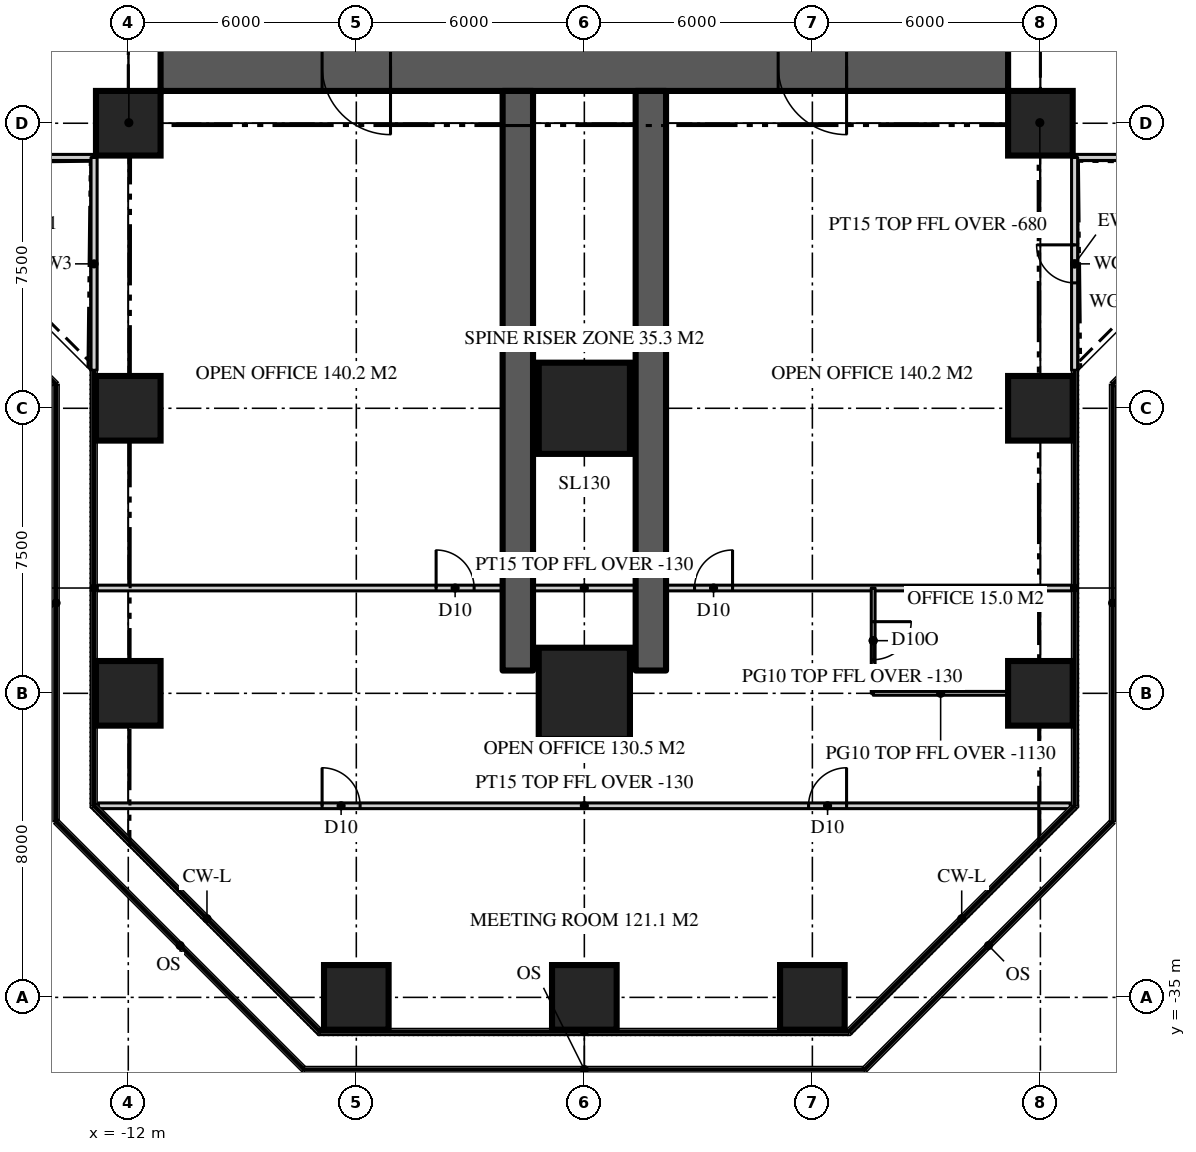
"""IFC4 building model, lengths in metres.
Left out: names, types, materials, properties, quantities, classifications, styles, units other than length and angle.
Written with IfcOpenShell. Run it as: python <this file> out.ifc"""

import sys

from ifc_helpers import new_model, si_unit, direction, frame, frame_2d, origin, origin_2d, place, context, subcontext, project, spatial, rectangle, extrude, element, fill, save


model = new_model("IFC4")
c1 = context("Model", 3, precision=1e-05, world=origin(), true_north=direction((0.0, 1.0)))
c2 = subcontext(c1, "Body", "Model", "MODEL_VIEW")
j1 = project(units=[si_unit("LENGTHUNIT", "METRE"), si_unit("PLANEANGLEUNIT", "RADIAN")], contexts=[c1])
p1 = place(None, origin())
s1 = spatial("IfcSite", under=j1, at=p1, CompositionType="ELEMENT")
p2 = place(p1, origin())
s2 = spatial("IfcBuilding", under=s1, at=p2, CompositionType="ELEMENT")
p3 = place(p2, frame((0.0, 0.0, 63.0)))
s3 = spatial("IfcBuildingStorey", under=s2, at=p3, CompositionType="ELEMENT", Elevation=63.0)
p4 = place(p3, frame((11.15, -10.5, 0.0), z_axis=(0.0, 0.0, 1.0), x_axis=(-1.0, 0.0, 0.0)))
e1 = element("IfcWall", 1, at=p4, inside=s3, PredefinedType="SHEAR", context=c2, shape_type="SweptSolid", body=[
    extrude(rectangle(XDim=22.3, YDim=1.3, at=frame_2d((11.15, 0.0))), origin(), (0.0, 0.0, 1.0), 3.9),
])
p5 = place(p4, frame((16.25, 0.0, 0.0)))
e2 = element("IfcOpeningElement", 2, at=p5, cuts=e1, PredefinedType="OPENING", context=c2, shape_type="SweptSolid", body=[
    extrude(rectangle(XDim=1.8, YDim=2.2, at=frame_2d((0.9, 1.1))), frame((0.0, 0.66, 0.0), z_axis=(0.0, -1.0, 0.0), x_axis=(1.0, 0.0, 0.0)), (0.0, 0.0, 1.0), 1.32),
])
p6 = place(p4, frame((4.25, 0.0, 0.0)))
e3 = element("IfcOpeningElement", 3, at=p6, cuts=e1, PredefinedType="OPENING", context=c2, shape_type="SweptSolid", body=[
    extrude(rectangle(XDim=1.8, YDim=2.2, at=frame_2d((0.9, 1.1))), frame((0.0, 0.66, 0.0), z_axis=(0.0, -1.0, 0.0), x_axis=(1.0, 0.0, 0.0)), (0.0, 0.0, 1.0), 1.32),
])
for number, where, z_axis, x_axis in (
    (4, (-1.75, -11.15, 0.0), (0.0, 0.0, 1.0), (0.0, -1.0, 0.0)),
    (5, (1.75, -11.15, 0.0), (0.0, 0.0, 1.0), (0.0, -1.0, 0.0)),
):
    element("IfcWall", number, at=place(p3, frame(where, z_axis=z_axis, x_axis=x_axis)), inside=s3, PredefinedType="SHEAR", context=c2, shape_type="SweptSolid", body=[
        extrude(rectangle(XDim=15.25, YDim=0.8, at=frame_2d((7.625, 0.0))), origin(), (0.0, 0.0, 1.0), 3.9),
    ])
for number, where, z_axis, x_axis in (
    (6, (-6.0, -35.0, 0.0), (0.0, 0.0, 1.0), (1.0, 0.0, 0.0)),
    (7, (0.0, -35.0, 0.0), (0.0, 0.0, 1.0), (1.0, 0.0, 0.0)),
    (8, (6.0, -35.0, 0.0), (0.0, 0.0, 1.0), (1.0, 0.0, 0.0)),
    (9, (-12.0, -27.0, 0.0), (0.0, 0.0, 1.0), (1.0, 0.0, 0.0)),
):
    element("IfcColumn", number, at=place(p3, frame(where, z_axis=z_axis, x_axis=x_axis)), inside=s3, PredefinedType="COLUMN", context=c2, shape_type="SweptSolid", body=[
        extrude(rectangle(XDim=1.7, YDim=1.7, at=origin_2d()), origin(), (0.0, 0.0, 1.0), 3.9),
    ])
p7 = place(p3, frame((0.0, -27.0, 0.0), z_axis=(0.0, 0.0, 1.0), x_axis=(1.0, 0.0, 0.0)))
e10 = element("IfcColumn", 10, at=p7, inside=s3, PredefinedType="COLUMN", context=c2, shape_type="SweptSolid", body=[
    extrude(rectangle(XDim=2.4, YDim=2.4, at=origin_2d()), origin(), (0.0, 0.0, 1.0), 3.9),
])
for number, where, z_axis, x_axis in (
    (11, (12.0, -27.0, 0.0), (0.0, 0.0, 1.0), (1.0, 0.0, 0.0)),
    (12, (-12.0, -19.5, 0.0), (0.0, 0.0, 1.0), (1.0, 0.0, 0.0)),
):
    element("IfcColumn", number, at=place(p3, frame(where, z_axis=z_axis, x_axis=x_axis)), inside=s3, PredefinedType="COLUMN", context=c2, shape_type="SweptSolid", body=[
        extrude(rectangle(XDim=1.7, YDim=1.7, at=origin_2d()), origin(), (0.0, 0.0, 1.0), 3.9),
    ])
p8 = place(p3, frame((0.0, -19.5, 0.0), z_axis=(0.0, 0.0, 1.0), x_axis=(1.0, 0.0, 0.0)))
e13 = element("IfcColumn", 13, at=p8, inside=s3, PredefinedType="COLUMN", context=c2, shape_type="SweptSolid", body=[
    extrude(rectangle(XDim=2.4, YDim=2.4, at=origin_2d()), origin(), (0.0, 0.0, 1.0), 3.9),
])
for number, where, z_axis, x_axis in (
    (14, (12.0, -19.5, 0.0), (0.0, 0.0, 1.0), (1.0, 0.0, 0.0)),
    (15, (-12.0, -12.0, 0.0), (0.0, 0.0, 1.0), (1.0, 0.0, 0.0)),
    (16, (12.0, -12.0, 0.0), (0.0, 0.0, 1.0), (1.0, 0.0, 0.0)),
):
    element("IfcColumn", number, at=place(p3, frame(where, z_axis=z_axis, x_axis=x_axis)), inside=s3, PredefinedType="COLUMN", context=c2, shape_type="SweptSolid", body=[
        extrude(rectangle(XDim=1.7, YDim=1.7, at=origin_2d()), origin(), (0.0, 0.0, 1.0), 3.9),
    ])
p9 = place(p3, frame((12.9, -12.9, 0.0), z_axis=(0.0, 0.0, 1.0), x_axis=(1.0, 0.0, 0.0)))
e17 = element("IfcWall", 17, at=p9, inside=s3, PredefinedType="SOLIDWALL", context=c2, shape_type="SweptSolid", body=[
    extrude(rectangle(XDim=5.6, YDim=0.16, at=frame_2d((2.8, 0.0))), origin(), (0.0, 0.0, 1.0), 3.77),
])
p10 = place(p3, frame((-18.5, -12.9, 0.0), z_axis=(0.0, 0.0, 1.0), x_axis=(1.0, 0.0, 0.0)))
e18 = element("IfcWall", 18, at=p10, inside=s3, PredefinedType="SOLIDWALL", context=c2, shape_type="SweptSolid", body=[
    extrude(rectangle(XDim=5.6, YDim=0.16, at=frame_2d((2.8, 0.0))), origin(), (0.0, 0.0, 1.0), 3.77),
])
p11 = place(p10, frame((2.3, 0.0, 0.0)))
e19 = element("IfcOpeningElement", 19, at=p11, cuts=e18, PredefinedType="OPENING", context=c2, shape_type="SweptSolid", body=[
    extrude(rectangle(XDim=1.0, YDim=2.2, at=frame_2d((0.5, 1.1))), frame((0.0, 0.09, 0.0), z_axis=(0.0, -1.0, 0.0), x_axis=(1.0, 0.0, 0.0)), (0.0, 0.0, 1.0), 0.18),
])
p12 = place(p3, frame((-12.9, -12.9, 0.0), z_axis=(0.0, 0.0, 1.0), x_axis=(0.0, -1.0, 0.0)))
e20 = element("IfcWall", 20, at=p12, inside=s3, PredefinedType="SOLIDWALL", context=c2, shape_type="SweptSolid", body=[
    extrude(rectangle(XDim=5.6, YDim=0.16, at=frame_2d((2.8, 0.0))), origin(), (0.0, 0.0, 1.0), 3.77),
])
p13 = place(p3, frame((12.9, -18.5, 0.0), z_axis=(0.0, 0.0, 1.0), x_axis=(0.0, 1.0, 0.0)))
e21 = element("IfcWall", 21, at=p13, inside=s3, PredefinedType="SOLIDWALL", context=c2, shape_type="SweptSolid", body=[
    extrude(rectangle(XDim=5.6, YDim=0.16, at=frame_2d((2.8, 0.0))), origin(), (0.0, 0.0, 1.0), 3.77),
])
p14 = place(p13, frame((2.3, 0.0, 0.0)))
e22 = element("IfcOpeningElement", 22, at=p14, cuts=e21, PredefinedType="OPENING", context=c2, shape_type="SweptSolid", body=[
    extrude(rectangle(XDim=1.0, YDim=2.2, at=frame_2d((0.5, 1.1))), frame((0.0, 0.09, 0.0), z_axis=(0.0, -1.0, 0.0), x_axis=(1.0, 0.0, 0.0)), (0.0, 0.0, 1.0), 0.18),
])
p15 = place(p3, frame((-12.82, -24.229, 0.0), z_axis=(0.0, 0.0, 1.0), x_axis=(1.0, 0.0, 0.0)))
e23 = element("IfcWall", 23, at=p15, inside=s3, PredefinedType="PARTITIONING", context=c2, shape_type="SweptSolid", body=[
    extrude(rectangle(XDim=25.64, YDim=0.15, at=frame_2d((12.82, 0.0))), origin(), (0.0, 0.0, 1.0), 3.77),
])
p16 = place(p15, frame((15.72, 0.0, 0.0)))
e24 = element("IfcOpeningElement", 24, at=p16, cuts=e23, PredefinedType="OPENING", context=c2, shape_type="SweptSolid", body=[
    extrude(rectangle(XDim=1.0, YDim=2.2, at=frame_2d((0.5, 1.1))), frame((0.0, 0.085, 0.0), z_axis=(0.0, -1.0, 0.0), x_axis=(1.0, 0.0, 0.0)), (0.0, 0.0, 1.0), 0.17),
])
p17 = place(p15, frame((8.92, 0.0, 0.0)))
e25 = element("IfcOpeningElement", 25, at=p17, cuts=e23, PredefinedType="OPENING", context=c2, shape_type="SweptSolid", body=[
    extrude(rectangle(XDim=1.0, YDim=2.2, at=frame_2d((0.5, 1.1))), frame((0.0, 0.085, 0.0), z_axis=(0.0, -1.0, 0.0), x_axis=(1.0, 0.0, 0.0)), (0.0, 0.0, 1.0), 0.17),
])
p18 = place(p3, frame((-12.786, -29.959, 0.0), z_axis=(0.0, 0.0, 1.0), x_axis=(1.0, 0.0, 0.0)))
e26 = element("IfcWall", 26, at=p18, inside=s3, PredefinedType="PARTITIONING", context=c2, shape_type="SweptSolid", body=[
    extrude(rectangle(XDim=25.573, YDim=0.15, at=frame_2d((12.786, 0.0))), origin(), (0.0, 0.0, 1.0), 3.77),
])
p19 = place(p18, frame((18.687, 0.0, 0.0)))
e27 = element("IfcOpeningElement", 27, at=p19, cuts=e26, PredefinedType="OPENING", context=c2, shape_type="SweptSolid", body=[
    extrude(rectangle(XDim=1.0, YDim=2.2, at=frame_2d((0.5, 1.1))), frame((0.0, 0.085, 0.0), z_axis=(0.0, -1.0, 0.0), x_axis=(1.0, 0.0, 0.0)), (0.0, 0.0, 1.0), 0.17),
])
p20 = place(p18, frame((5.886, 0.0, 0.0)))
e28 = element("IfcOpeningElement", 28, at=p20, cuts=e26, PredefinedType="OPENING", context=c2, shape_type="SweptSolid", body=[
    extrude(rectangle(XDim=1.0, YDim=2.2, at=frame_2d((0.5, 1.1))), frame((0.0, 0.085, 0.0), z_axis=(0.0, -1.0, 0.0), x_axis=(1.0, 0.0, 0.0)), (0.0, 0.0, 1.0), 0.17),
])
p21 = place(p3, frame((7.6, -24.229, 0.0), z_axis=(0.0, 0.0, 1.0), x_axis=(0.0, -1.0, 0.0)))
e29 = element("IfcWall", 29, at=p21, inside=s3, PredefinedType="PARTITIONING", context=c2, shape_type="SweptSolid", body=[
    extrude(rectangle(XDim=2.771, YDim=0.1, at=frame_2d((1.385, 0.0))), origin(), (0.0, 0.0, 1.0), 3.77),
])
p22 = place(p21, frame((0.885, 0.0, 0.0)))
e30 = element("IfcOpeningElement", 30, at=p22, cuts=e29, PredefinedType="OPENING", context=c2, shape_type="SweptSolid", body=[
    extrude(rectangle(XDim=1.0, YDim=2.2, at=frame_2d((0.5, 1.1))), frame((0.0, 0.06, 0.0), z_axis=(0.0, -1.0, 0.0), x_axis=(1.0, 0.0, 0.0)), (0.0, 0.0, 1.0), 0.12),
])
p23 = place(p3, frame((7.6, -27.0, 0.0), z_axis=(0.0, 0.0, 1.0), x_axis=(1.0, 0.0, 0.0)))
e31 = element("IfcWall", 31, at=p23, inside=s3, PredefinedType="PARTITIONING", context=c2, shape_type="SweptSolid", body=[
    extrude(rectangle(XDim=3.55, YDim=0.1, at=frame_2d((1.775, 0.0))), origin(), (0.0, 0.0, 1.0), 2.77),
])
for number, where, z_axis, x_axis in (
    (32, (-11.15, -11.15, 0.0), (0.0, 0.0, 1.0), (-0.707, -0.707, 0.0)),
    (33, (11.15, -11.15, 0.0), (0.0, 0.0, 1.0), (0.707, -0.707, 0.0)),
):
    element("IfcWall", number, at=place(p3, frame(where, z_axis=z_axis, x_axis=x_axis)), inside=s3, PredefinedType="PARTITIONING", context=c2, shape_type="SweptSolid", body=[
        extrude(rectangle(XDim=2.362, YDim=0.15, at=frame_2d((1.181, 0.0))), origin(), (0.0, 0.0, 1.0), 3.22),
    ])
p24 = place(p14, origin())
e34 = element("IfcDoor", 34, at=p24, inside=s3, OperationType="SINGLE_SWING_RIGHT", PredefinedType="DOOR", context=c2, shape_type="SweptSolid", body=[
    extrude(rectangle(XDim=1.0, YDim=2.2, at=frame_2d((0.5, 1.1))), frame((0.0, 0.025, 0.0), z_axis=(0.0, -1.0, 0.0), x_axis=(1.0, 0.0, 0.0)), (0.0, 0.0, 1.0), 0.05),
])
fill(e22, e34)
p25 = place(p5, origin())
e35 = element("IfcDoor", 35, at=p25, inside=s3, OperationType="DOUBLE_DOOR_DOUBLE_SWING", PredefinedType="DOOR", context=c2, shape_type="SweptSolid", body=[
    extrude(rectangle(XDim=1.8, YDim=2.2, at=frame_2d((0.9, 1.1))), frame((0.0, 0.025, 0.0), z_axis=(0.0, -1.0, 0.0), x_axis=(1.0, 0.0, 0.0)), (0.0, 0.0, 1.0), 0.05),
])
fill(e2, e35)
p26 = place(p6, origin())
e36 = element("IfcDoor", 36, at=p26, inside=s3, OperationType="DOUBLE_DOOR_DOUBLE_SWING", PredefinedType="DOOR", context=c2, shape_type="SweptSolid", body=[
    extrude(rectangle(XDim=1.8, YDim=2.2, at=frame_2d((0.9, 1.1))), frame((0.0, 0.025, 0.0), z_axis=(0.0, -1.0, 0.0), x_axis=(1.0, 0.0, 0.0)), (0.0, 0.0, 1.0), 0.05),
])
fill(e3, e36)
p27 = place(p16, origin())
e37 = element("IfcDoor", 37, at=p27, inside=s3, OperationType="SINGLE_SWING_RIGHT", PredefinedType="DOOR", context=c2, shape_type="SweptSolid", body=[
    extrude(rectangle(XDim=1.0, YDim=2.2, at=frame_2d((0.5, 1.1))), frame((0.0, 0.025, 0.0), z_axis=(0.0, -1.0, 0.0), x_axis=(1.0, 0.0, 0.0)), (0.0, 0.0, 1.0), 0.05),
])
fill(e24, e37)
p28 = place(p17, origin())
e38 = element("IfcDoor", 38, at=p28, inside=s3, OperationType="SINGLE_SWING_LEFT", PredefinedType="DOOR", context=c2, shape_type="SweptSolid", body=[
    extrude(rectangle(XDim=1.0, YDim=2.2, at=frame_2d((0.5, 1.1))), frame((0.0, 0.025, 0.0), z_axis=(0.0, -1.0, 0.0), x_axis=(1.0, 0.0, 0.0)), (0.0, 0.0, 1.0), 0.05),
])
fill(e25, e38)
p29 = place(p19, origin())
e39 = element("IfcDoor", 39, at=p29, inside=s3, OperationType="SINGLE_SWING_RIGHT", PredefinedType="DOOR", context=c2, shape_type="SweptSolid", body=[
    extrude(rectangle(XDim=1.0, YDim=2.2, at=frame_2d((0.5, 1.1))), frame((0.0, 0.025, 0.0), z_axis=(0.0, -1.0, 0.0), x_axis=(1.0, 0.0, 0.0)), (0.0, 0.0, 1.0), 0.05),
])
fill(e27, e39)
p30 = place(p20, origin())
e40 = element("IfcDoor", 40, at=p30, inside=s3, OperationType="SINGLE_SWING_LEFT", PredefinedType="DOOR", context=c2, shape_type="SweptSolid", body=[
    extrude(rectangle(XDim=1.0, YDim=2.2, at=frame_2d((0.5, 1.1))), frame((0.0, 0.025, 0.0), z_axis=(0.0, -1.0, 0.0), x_axis=(1.0, 0.0, 0.0)), (0.0, 0.0, 1.0), 0.05),
])
fill(e28, e40)
p31 = place(p22, origin())
e41 = element("IfcDoor", 41, at=p31, inside=s3, OperationType="SINGLE_SWING_LEFT", PredefinedType="DOOR", context=c2, shape_type="SweptSolid", body=[
    extrude(rectangle(XDim=1.0, YDim=2.2, at=frame_2d((0.5, 1.1))), frame((0.0, 0.025, 0.0), z_axis=(0.0, -1.0, 0.0), x_axis=(1.0, 0.0, 0.0)), (0.0, 0.0, 1.0), 0.05),
])
fill(e30, e41)
save(model, sys.argv[1])
